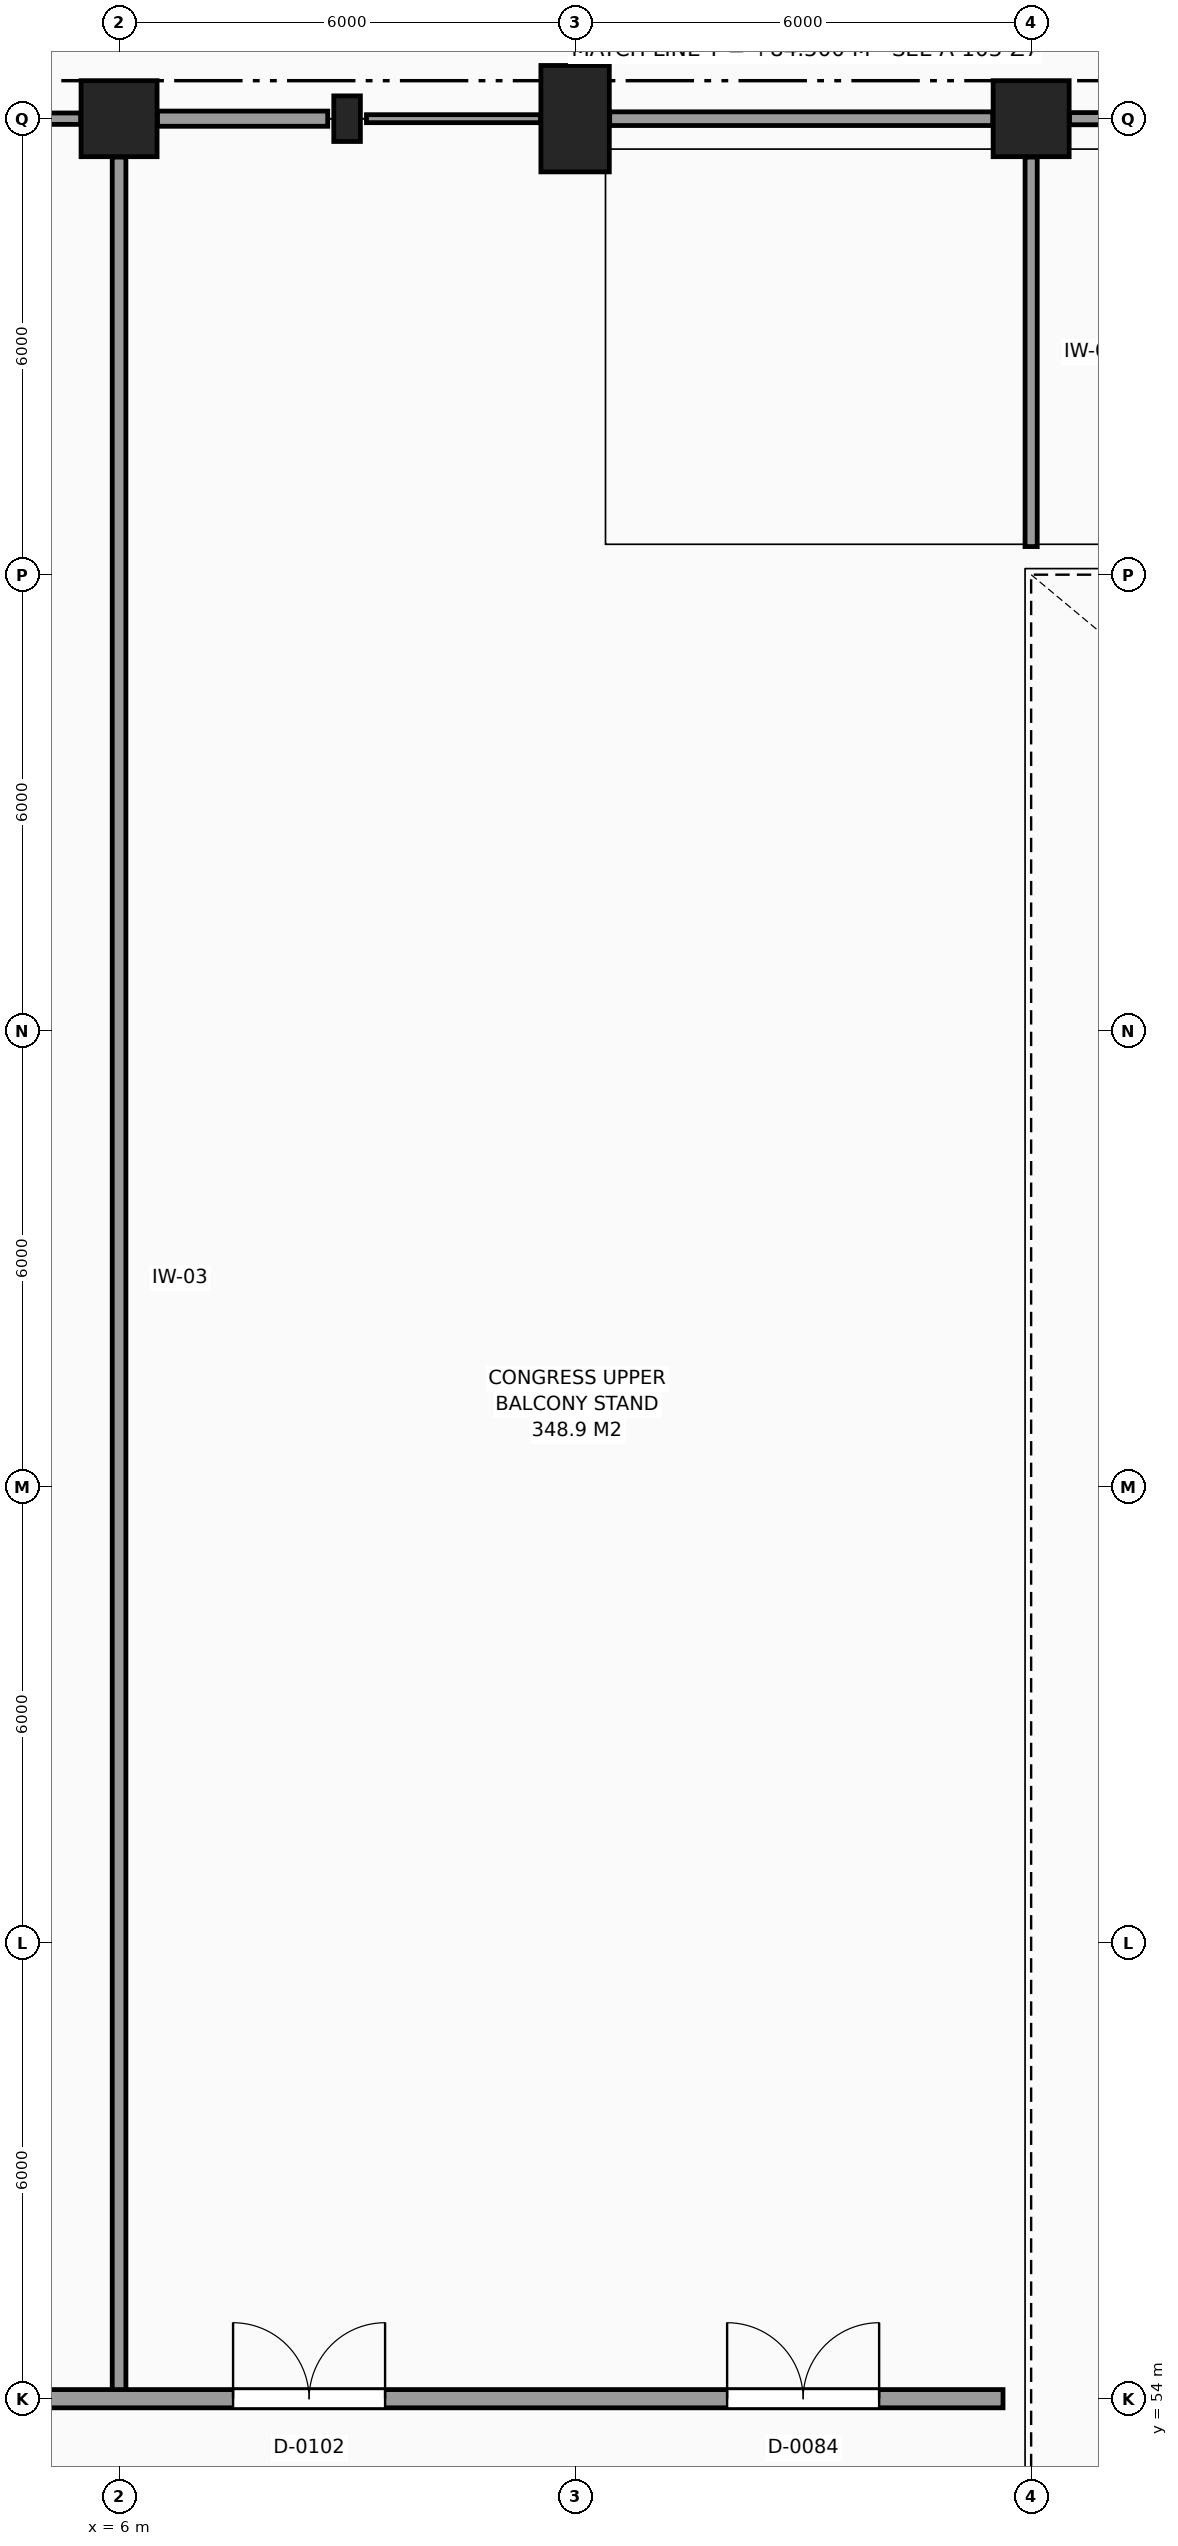
"""IFC4 building model, lengths in metres.
Left out: names, types, materials, properties, quantities, classifications, styles, units other than length and angle.
Written with IfcOpenShell. Run it as: python <this file> out.ifc"""

import sys

from ifc_helpers import new_model, si_unit, direction, frame, frame_2d, origin, origin_2d, place, context, subcontext, project, spatial, rectangle, extrude, element, fill, save


model = new_model("IFC4")
c1 = context("Model", 3, precision=1e-05, world=origin(), true_north=direction((0.0, 1.0)))
c2 = subcontext(c1, "Body", "Model", "MODEL_VIEW")
j1 = project(units=[si_unit("LENGTHUNIT", "METRE"), si_unit("PLANEANGLEUNIT", "RADIAN")], contexts=[c1])
p1 = place(None, origin())
s1 = spatial("IfcSite", under=j1, at=p1, CompositionType="ELEMENT")
p2 = place(p1, origin())
s2 = spatial("IfcBuilding", under=s1, at=p2, CompositionType="ELEMENT")
p3 = place(p2, frame((0.0, 0.0, 10.5)))
s3 = spatial("IfcBuildingStorey", under=s2, at=p3, CompositionType="ELEMENT", Elevation=10.5)
p4 = place(p3, frame((6.0, 84.0, 0.0), z_axis=(0.0, 0.0, 1.0), x_axis=(1.0, 0.0, 0.0)))
e1 = element("IfcColumn", 1, at=p4, inside=s3, PredefinedType="COLUMN", context=c2, shape_type="SweptSolid", body=[
    extrude(rectangle(XDim=1.0, YDim=1.0, at=origin_2d()), origin(), (0.0, 0.0, 1.0), 4.5),
])
p5 = place(p3, frame((12.0, 84.0, 0.0), z_axis=(0.0, 0.0, 1.0), x_axis=(1.0, 0.0, 0.0)))
e2 = element("IfcColumn", 2, at=p5, inside=s3, PredefinedType="COLUMN", context=c2, shape_type="SweptSolid", body=[
    extrude(rectangle(XDim=0.9, YDim=1.4, at=origin_2d()), origin(), (0.0, 0.0, 1.0), 4.5),
])
p6 = place(p3, frame((18.0, 84.0, 0.0), z_axis=(0.0, 0.0, 1.0), x_axis=(1.0, 0.0, 0.0)))
e3 = element("IfcColumn", 3, at=p6, inside=s3, PredefinedType="COLUMN", context=c2, shape_type="SweptSolid", body=[
    extrude(rectangle(XDim=1.0, YDim=1.0, at=origin_2d()), origin(), (0.0, 0.0, 1.0), 4.5),
])
p7 = place(p3, frame((9.0, 84.0, 0.0), z_axis=(0.0, 0.0, 1.0), x_axis=(1.0, 0.0, 0.0)))
e4 = element("IfcColumn", 4, at=p7, inside=s3, PredefinedType="PILASTER", context=c2, shape_type="SweptSolid", body=[
    extrude(rectangle(XDim=0.35, YDim=0.6, at=origin_2d()), origin(), (0.0, 0.0, 1.0), 4.5),
])
p8 = place(p3, frame((6.0, 54.0, 0.0), z_axis=(0.0, 0.0, 1.0), x_axis=(0.0, 1.0, 0.0)))
e5 = element("IfcWall", 5, at=p8, inside=s3, PredefinedType="PARTITIONING", context=c2, shape_type="SweptSolid", body=[
    extrude(rectangle(XDim=29.495, YDim=0.18, at=frame_2d((14.748, 0.0))), origin(), (0.0, 0.0, 1.0), 4.24),
])
p9 = place(p3, frame((18.0, 78.37, 0.0), z_axis=(0.0, 0.0, 1.0), x_axis=(0.0, 1.0, 0.0)))
e6 = element("IfcWall", 6, at=p9, inside=s3, PredefinedType="PARTITIONING", context=c2, shape_type="SweptSolid", body=[
    extrude(rectangle(XDim=5.125, YDim=0.16, at=frame_2d((2.562, 0.0))), origin(), (0.0, 0.0, 1.0), 4.24),
])
p10 = place(p3, frame((0.505, 54.0, 0.0), z_axis=(0.0, 0.0, 1.0), x_axis=(1.0, 0.0, 0.0)))
e7 = element("IfcWall", 7, at=p10, inside=s3, PredefinedType="PARTITIONING", context=c2, shape_type="SweptSolid", body=[
    extrude(rectangle(XDim=17.125, YDim=0.24, at=frame_2d((8.562, 0.0))), origin(), (0.0, 0.0, 1.0), 4.24),
])
p11 = place(p10, frame((13.495, 0.0, 0.0)))
e8 = element("IfcOpeningElement", 8, at=p11, cuts=e7, PredefinedType="OPENING", context=c2, shape_type="SweptSolid", body=[
    extrude(rectangle(XDim=2.0, YDim=2.45, at=frame_2d((1.0, 1.225))), frame((0.0, 0.13, 0.0), z_axis=(0.0, -1.0, 0.0), x_axis=(1.0, 0.0, 0.0)), (0.0, 0.0, 1.0), 0.26),
])
p12 = place(p10, frame((6.995, 0.0, 0.0)))
e9 = element("IfcOpeningElement", 9, at=p12, cuts=e7, PredefinedType="OPENING", context=c2, shape_type="SweptSolid", body=[
    extrude(rectangle(XDim=2.0, YDim=2.45, at=frame_2d((1.0, 1.225))), frame((0.0, 0.13, 0.0), z_axis=(0.0, -1.0, 0.0), x_axis=(1.0, 0.0, 0.0)), (0.0, 0.0, 1.0), 0.26),
])
p13 = place(p3, frame((0.455, 84.0, 0.0), z_axis=(0.0, 0.0, 1.0), x_axis=(1.0, 0.0, 0.0)))
e10 = element("IfcWall", 10, at=p13, inside=s3, PredefinedType="PARTITIONING", context=c2, shape_type="SweptSolid", body=[
    extrude(rectangle(XDim=5.04, YDim=0.15, at=frame_2d((2.52, 0.0))), origin(), (0.0, 0.0, 1.0), 3.79),
])
p14 = place(p3, frame((6.505, 84.0, 0.0), z_axis=(0.0, 0.0, 1.0), x_axis=(1.0, 0.0, 0.0)))
e11 = element("IfcWall", 11, at=p14, inside=s3, PredefinedType="PARTITIONING", context=c2, shape_type="SweptSolid", body=[
    extrude(rectangle(XDim=2.24, YDim=0.2, at=frame_2d((1.12, 0.0))), origin(), (0.0, 0.0, 1.0), 3.95),
])
p15 = place(p3, frame((9.255, 84.0, 0.0), z_axis=(0.0, 0.0, 1.0), x_axis=(1.0, 0.0, 0.0)))
e12 = element("IfcWall", 12, at=p15, inside=s3, PredefinedType="PARTITIONING", context=c2, shape_type="SweptSolid", body=[
    extrude(rectangle(XDim=2.29, YDim=0.105, at=frame_2d((1.145, 0.0))), origin(), (0.0, 0.0, 1.0), 3.95),
])
p16 = place(p3, frame((12.455, 84.0, 0.0), z_axis=(0.0, 0.0, 1.0), x_axis=(1.0, 0.0, 0.0)))
e13 = element("IfcWall", 13, at=p16, inside=s3, PredefinedType="PARTITIONING", context=c2, shape_type="SweptSolid", body=[
    extrude(rectangle(XDim=5.04, YDim=0.18, at=frame_2d((2.52, 0.0))), origin(), (0.0, 0.0, 1.0), 3.44),
])
p17 = place(p3, frame((18.505, 84.0, 0.0), z_axis=(0.0, 0.0, 1.0), x_axis=(1.0, 0.0, 0.0)))
e14 = element("IfcWall", 14, at=p17, inside=s3, PredefinedType="PARTITIONING", context=c2, shape_type="SweptSolid", body=[
    extrude(rectangle(XDim=5.04, YDim=0.16, at=frame_2d((2.52, 0.0))), origin(), (0.0, 0.0, 1.0), 3.54),
])
p18 = place(p11, origin())
e15 = element("IfcDoor", 15, at=p18, inside=s3, OperationType="DOUBLE_DOOR_SINGLE_SWING", PredefinedType="DOOR", context=c2, shape_type="SweptSolid", body=[
    extrude(rectangle(XDim=2.0, YDim=2.45, at=frame_2d((1.0, 1.225))), frame((0.0, 0.025, 0.0), z_axis=(0.0, -1.0, 0.0), x_axis=(1.0, 0.0, 0.0)), (0.0, 0.0, 1.0), 0.05),
])
fill(e8, e15)
p19 = place(p12, origin())
e16 = element("IfcDoor", 16, at=p19, inside=s3, OperationType="DOUBLE_DOOR_SINGLE_SWING", PredefinedType="DOOR", context=c2, shape_type="SweptSolid", body=[
    extrude(rectangle(XDim=2.0, YDim=2.45, at=frame_2d((1.0, 1.225))), frame((0.0, 0.025, 0.0), z_axis=(0.0, -1.0, 0.0), x_axis=(1.0, 0.0, 0.0)), (0.0, 0.0, 1.0), 0.05),
])
fill(e9, e16)
save(model, sys.argv[1])
